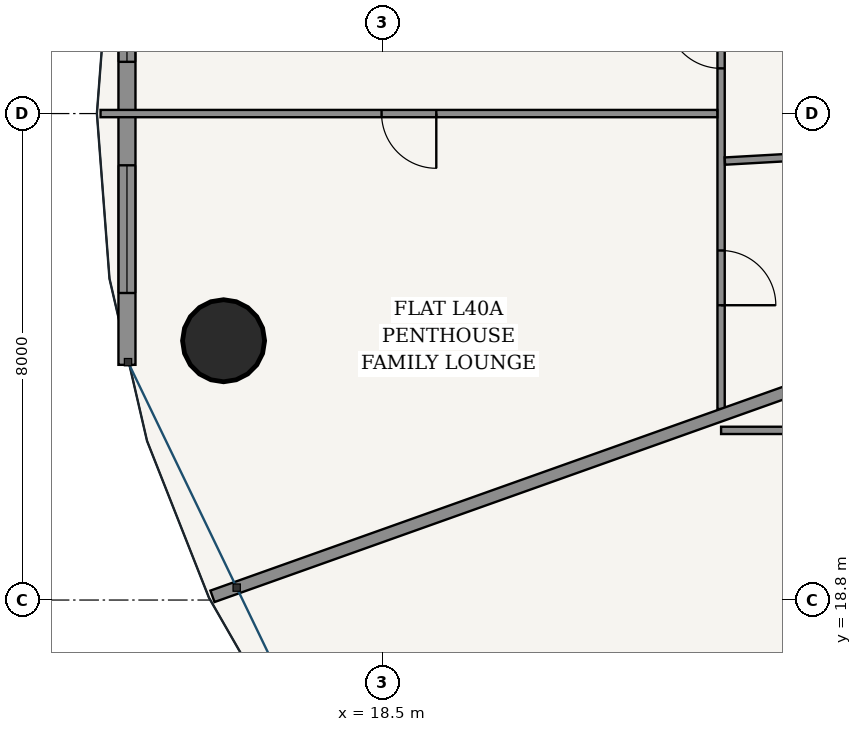
"""IFC4 building model, lengths in metres.
Left out: names, types, materials, properties, quantities, classifications, styles, units other than length and angle.
Written with IfcOpenShell. Run it as: python <this file> out.ifc"""

import sys

from ifc_helpers import new_model, si_unit, direction, frame, frame_2d, origin, origin_2d, place, context, subcontext, project, spatial, rectangle, hollow_circle, extrude, source, transform, mapped, element, fill, save


model = new_model("IFC4")
c1 = context("Model", 3, precision=1e-05, world=origin(), true_north=direction((-0.2419218956, 0.970295726276)))
c2 = subcontext(c1, "Body", "Model", "MODEL_VIEW")
j1 = project(units=[si_unit("LENGTHUNIT", "METRE"), si_unit("PLANEANGLEUNIT", "RADIAN")], contexts=[c1])
p1 = place(None, origin())
s1 = spatial("IfcSite", under=j1, at=p1, CompositionType="ELEMENT")
p2 = place(p1, origin())
s2 = spatial("IfcBuilding", under=s1, at=p2, CompositionType="ELEMENT")
p3 = place(p2, frame((0.0, 0.0, 153.4)))
s3 = spatial("IfcBuildingStorey", under=s2, at=p3, CompositionType="ELEMENT", Elevation=153.4)
p4 = place(p3, frame((15.883, 23.064, 0.0), z_axis=(0.0, 0.0, 1.0), x_axis=(1.0, 0.0, 0.0)))
e1 = element("IfcColumn", 1, at=p4, inside=s3, PredefinedType="COLUMN", context=c2, shape_type="SweptSolid", body=[
    extrude(hollow_circle(Radius=0.675, WallThickness=0.042, at=origin_2d()), origin(), (0.0, 0.0, 1.0), 3.6),
])
p5 = place(p3, frame((14.294, 30.932, 0.0), z_axis=(0.0, 0.0, 1.0), x_axis=(0.0, -1.0, 0.0)))
e2 = element("IfcWall", 2, at=p5, inside=s3, PredefinedType="SOLIDWALL", context=c2, shape_type="SweptSolid", body=[
    extrude(rectangle(XDim=8.264, YDim=0.28, at=frame_2d((4.132, 0.0))), origin(), (0.0, 0.0, 1.0), 3.33),
])
p6 = place(p5, frame((1.181, 0.0, 0.85)))
e3 = element("IfcOpeningElement", 3, at=p6, cuts=e2, PredefinedType="OPENING", context=c2, shape_type="SweptSolid", body=[
    extrude(rectangle(XDim=2.1, YDim=1.95, at=frame_2d((1.05, 0.975))), frame((0.0, 0.15, 0.0), z_axis=(0.0, -1.0, 0.0), x_axis=(1.0, 0.0, 0.0)), (0.0, 0.0, 1.0), 0.3),
])
p7 = place(p5, frame((4.983, 0.0, 0.85)))
e4 = element("IfcOpeningElement", 4, at=p7, cuts=e2, PredefinedType="OPENING", context=c2, shape_type="SweptSolid", body=[
    extrude(rectangle(XDim=2.1, YDim=1.95, at=frame_2d((1.05, 0.975))), frame((0.0, 0.15, 0.0), z_axis=(0.0, -1.0, 0.0), x_axis=(1.0, 0.0, 0.0)), (0.0, 0.0, 1.0), 0.3),
])
p8 = place(p3, frame((24.065, 21.941, 0.0), z_axis=(0.0, 0.0, 1.0), x_axis=(0.0, 1.0, 0.0)))
e5 = element("IfcWall", 5, at=p8, inside=s3, PredefinedType="PARTITIONING", context=c2, shape_type="SweptSolid", body=[
    extrude(rectangle(XDim=15.944, YDim=0.12, at=frame_2d((7.972, 0.0))), origin(), (0.0, 0.0, 1.0), 2.776),
])
p9 = place(p8, frame((5.602, 0.0, 0.0)))
e6 = element("IfcOpeningElement", 6, at=p9, cuts=e5, PredefinedType="OPENING", context=c2, shape_type="SweptSolid", body=[
    extrude(rectangle(XDim=0.9, YDim=2.15, at=frame_2d((0.45, 1.075))), frame((0.0, 0.07, 0.0), z_axis=(0.0, -1.0, 0.0), x_axis=(1.0, 0.0, 0.0)), (0.0, 0.0, 1.0), 0.14),
])
p10 = place(p8, frame((1.707, 0.0, 0.0)))
e7 = element("IfcOpeningElement", 7, at=p10, cuts=e5, PredefinedType="OPENING", context=c2, shape_type="SweptSolid", body=[
    extrude(rectangle(XDim=0.9, YDim=2.15, at=frame_2d((0.45, 1.075))), frame((0.0, 0.07, 0.0), z_axis=(0.0, -1.0, 0.0), x_axis=(1.0, 0.0, 0.0)), (0.0, 0.0, 1.0), 0.14),
])
p11 = place(p8, frame((11.402, 0.0, 0.0)))
e8 = element("IfcOpeningElement", 8, at=p11, cuts=e5, PredefinedType="OPENING", context=c2, shape_type="SweptSolid", body=[
    extrude(rectangle(XDim=0.9, YDim=2.15, at=frame_2d((0.45, 1.075))), frame((0.0, 0.07, 0.0), z_axis=(0.0, -1.0, 0.0), x_axis=(1.0, 0.0, 0.0)), (0.0, 0.0, 1.0), 0.14),
])
p12 = place(p3, frame((24.003, 26.8, 0.0), z_axis=(0.0, 0.0, 1.0), x_axis=(-1.0, 0.0, 0.0)))
e9 = element("IfcWall", 9, at=p12, inside=s3, PredefinedType="PARTITIONING", context=c2, shape_type="SweptSolid", body=[
    extrude(rectangle(XDim=10.143, YDim=0.12, at=frame_2d((5.071, 0.0))), origin(), (0.0, 0.0, 1.0), 2.846),
])
p13 = place(p12, frame((4.622, 0.0, 0.0)))
e10 = element("IfcOpeningElement", 10, at=p13, cuts=e9, PredefinedType="OPENING", context=c2, shape_type="SweptSolid", body=[
    extrude(rectangle(XDim=0.9, YDim=2.15, at=frame_2d((0.45, 1.075))), frame((0.0, 0.07, 0.0), z_axis=(0.0, -1.0, 0.0), x_axis=(1.0, 0.0, 0.0)), (0.0, 0.0, 1.0), 0.14),
])
p14 = place(p3, frame((26.715, 26.164, 0.0), z_axis=(0.0, 0.0, 1.0), x_axis=(-0.998418047295, -0.056226353574, 0.0)))
e11 = element("IfcWall", 11, at=p14, inside=s3, PredefinedType="PARTITIONING", context=c2, shape_type="SweptSolid", body=[
    extrude(rectangle(XDim=2.592, YDim=0.12, at=frame_2d((1.296, 0.0))), origin(), (0.0, 0.0, 1.0), 3.33),
])
p15 = place(p3, frame((28.723, 23.497, 0.0), z_axis=(0.0, 0.0, 1.0), x_axis=(-0.942077095572, -0.335396401292, 0.0)))
e12 = element("IfcWall", 12, at=p15, inside=s3, PredefinedType="PARTITIONING", context=c2, shape_type="SweptSolid", body=[
    extrude(rectangle(XDim=13.823, YDim=0.2, at=frame_2d((6.912, 0.0))), origin(), (0.0, 0.0, 1.0), 2.846),
])
p16 = place(p3, frame((26.075, 21.59, 0.0), z_axis=(0.0, 0.0, 1.0), x_axis=(-1.0, 0.0, 0.0)))
e13 = element("IfcWall", 13, at=p16, inside=s3, PredefinedType="PARTITIONING", context=c2, shape_type="SweptSolid", body=[
    extrude(rectangle(XDim=2.01, YDim=0.12, at=frame_2d((1.005, 0.0))), origin(), (0.0, 0.0, 1.0), 3.33),
])
m1 = source(origin(), c2, "Body", "SweptSolid", [
    extrude(rectangle(XDim=2.1, YDim=1.95, at=frame_2d((1.05, 0.975))), frame((0.0, 0.03, 0.0), z_axis=(0.0, -1.0, 0.0), x_axis=(1.0, 0.0, 0.0)), (0.0, 0.0, 1.0), 0.06),
])
p17 = place(p6, origin())
e14 = element("IfcWindow", 14, at=p17, inside=s3, PartitioningType="SINGLE_PANEL", PredefinedType="WINDOW", context=c2, shape_type="MappedRepresentation", body=[
    mapped(m1, transform((0.0, 0.0, 0.0), scale=1.0)),
])
fill(e3, e14)
p18 = place(p7, origin())
e15 = element("IfcWindow", 15, at=p18, inside=s3, PartitioningType="SINGLE_PANEL", PredefinedType="WINDOW", context=c2, shape_type="MappedRepresentation", body=[
    mapped(m1, transform((0.0, 0.0, 0.0), scale=1.0)),
])
fill(e4, e15)
m2 = source(origin(), c2, "Body", "SweptSolid", [
    extrude(rectangle(XDim=0.9, YDim=2.15, at=frame_2d((0.45, 1.075))), frame((0.0, 0.025, 0.0), z_axis=(0.0, -1.0, 0.0), x_axis=(1.0, 0.0, 0.0)), (0.0, 0.0, 1.0), 0.05),
])
p19 = place(p9, origin())
e16 = element("IfcDoor", 16, at=p19, inside=s3, OperationType="SINGLE_SWING_RIGHT", PredefinedType="DOOR", context=c2, shape_type="MappedRepresentation", body=[
    mapped(m2, transform((0.0, 0.0, 0.0), scale=1.0)),
])
fill(e6, e16)
p20 = place(p13, origin())
e17 = element("IfcDoor", 17, at=p20, inside=s3, OperationType="SINGLE_SWING_LEFT", PredefinedType="DOOR", context=c2, shape_type="MappedRepresentation", body=[
    mapped(m2, transform((0.0, 0.0, 0.0), scale=1.0)),
])
fill(e10, e17)
p21 = place(p10, frame((0.9, 0.0, 0.0), z_axis=(0.0, 0.0, 1.0), x_axis=(-1.0, 0.0, 0.0)))
e18 = element("IfcDoor", 18, at=p21, inside=s3, OperationType="SINGLE_SWING_RIGHT", PredefinedType="DOOR", context=c2, shape_type="MappedRepresentation", body=[
    mapped(m2, transform((0.0, 0.0, 0.0), scale=1.0)),
])
fill(e7, e18)
save(model, sys.argv[1])
